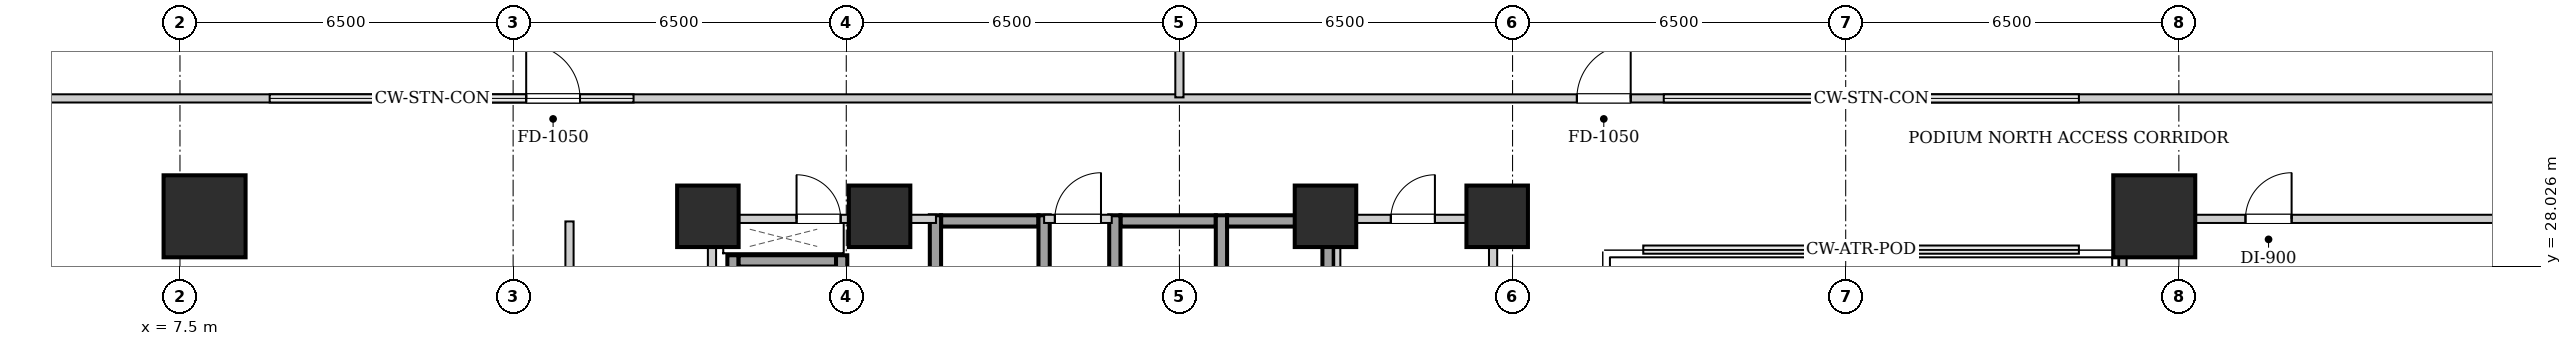
"""IFC4 building model, lengths in metres.
Left out: names, types, materials, properties, quantities, classifications, styles, units other than length and angle.
Written with IfcOpenShell. Run it as: python <this file> out.ifc"""

import sys

from ifc_helpers import new_model, si_unit, direction, frame, frame_2d, origin, origin_2d, place, context, subcontext, project, spatial, rectangle, extrude, element, fill, save


model = new_model("IFC4")
c1 = context("Model", 3, precision=1e-05, world=origin(), true_north=direction((0.0, 1.0)))
c2 = subcontext(c1, "Body", "Model", "MODEL_VIEW")
j1 = project(units=[si_unit("LENGTHUNIT", "METRE"), si_unit("PLANEANGLEUNIT", "RADIAN")], contexts=[c1])
p1 = place(None, origin())
s1 = spatial("IfcSite", under=j1, at=p1, CompositionType="ELEMENT")
p2 = place(p1, origin())
s2 = spatial("IfcBuilding", under=s1, at=p2, CompositionType="ELEMENT")
p3 = place(p2, frame((0.0, 0.0, 6.0)))
s3 = spatial("IfcBuildingStorey", under=s2, at=p3, CompositionType="ELEMENT", Elevation=6.0)
for number, where, z_axis, x_axis in (
    (1, (7.98, 29.0, 0.0), (0.0, 0.0, 1.0), (1.0, 0.0, 0.0)),
    (2, (46.02, 29.0, 0.0), (0.0, 0.0, 1.0), (1.0, 0.0, 0.0)),
):
    element("IfcColumn", number, at=place(p3, frame(where, z_axis=z_axis, x_axis=x_axis)), inside=s3, PredefinedType="COLUMN", context=c2, shape_type="SweptSolid", body=[
        extrude(rectangle(XDim=1.6, YDim=1.6, at=origin_2d()), origin(), (0.0, 0.0, 1.0), 5.2),
    ])
for number, where, z_axis, x_axis in (
    (3, (17.8, 29.0, 0.0), (0.0, 0.0, 1.0), (1.0, 0.0, 0.0)),
    (4, (21.15, 29.0, 0.0), (0.0, 0.0, 1.0), (1.0, 0.0, 0.0)),
    (5, (29.85, 29.0, 0.0), (0.0, 0.0, 1.0), (1.0, 0.0, 0.0)),
    (6, (33.2, 29.0, 0.0), (0.0, 0.0, 1.0), (1.0, 0.0, 0.0)),
):
    element("IfcColumn", number, at=place(p3, frame(where, z_axis=z_axis, x_axis=x_axis)), inside=s3, PredefinedType="COLUMN", context=c2, shape_type="SweptSolid", body=[
        extrude(rectangle(XDim=1.2, YDim=1.2, at=origin_2d()), origin(), (0.0, 0.0, 1.0), 5.2),
    ])
p4 = place(p3, frame((22.35, 28.91, 0.0), z_axis=(0.0, 0.0, 1.0), x_axis=(1.0, 0.0, 0.0)))
e7 = element("IfcWall", 7, at=p4, inside=s3, PredefinedType="SHEAR", context=c2, shape_type="SweptSolid", body=[
    extrude(rectangle(XDim=1.9, YDim=0.22, at=frame_2d((0.95, 0.0))), origin(), (0.0, 0.0, 1.0), 4.88),
])
for number, where, z_axis, x_axis in (
    (8, (22.24, 26.58, 0.0), (0.0, 0.0, 1.0), (0.0, 1.0, 0.0)),
    (9, (24.36, 26.58, 0.0), (0.0, 0.0, 1.0), (0.0, 1.0, 0.0)),
):
    element("IfcWall", number, at=place(p3, frame(where, z_axis=z_axis, x_axis=x_axis)), inside=s3, PredefinedType="SHEAR", context=c2, shape_type="SweptSolid", body=[
        extrude(rectangle(XDim=2.44, YDim=0.22, at=frame_2d((1.22, 0.0))), origin(), (0.0, 0.0, 1.0), 4.88),
    ])
p5 = place(p3, frame((25.85, 28.91, 0.0), z_axis=(0.0, 0.0, 1.0), x_axis=(1.0, 0.0, 0.0)))
e10 = element("IfcWall", 10, at=p5, inside=s3, PredefinedType="SHEAR", context=c2, shape_type="SweptSolid", body=[
    extrude(rectangle(XDim=1.86, YDim=0.22, at=frame_2d((0.93, 0.0))), origin(), (0.0, 0.0, 1.0), 4.88),
])
for number, where, z_axis, x_axis in (
    (11, (25.74, 26.58, 0.0), (0.0, 0.0, 1.0), (0.0, 1.0, 0.0)),
    (12, (27.82, 26.58, 0.0), (0.0, 0.0, 1.0), (0.0, 1.0, 0.0)),
):
    element("IfcWall", number, at=place(p3, frame(where, z_axis=z_axis, x_axis=x_axis)), inside=s3, PredefinedType="SHEAR", context=c2, shape_type="SweptSolid", body=[
        extrude(rectangle(XDim=2.44, YDim=0.22, at=frame_2d((1.22, 0.0))), origin(), (0.0, 0.0, 1.0), 4.88),
    ])
p6 = place(p3, frame((27.93, 28.91, 0.0), z_axis=(0.0, 0.0, 1.0), x_axis=(1.0, 0.0, 0.0)))
e13 = element("IfcWall", 13, at=p6, inside=s3, PredefinedType="SHEAR", context=c2, shape_type="SweptSolid", body=[
    extrude(rectangle(XDim=1.86, YDim=0.22, at=frame_2d((0.93, 0.0))), origin(), (0.0, 0.0, 1.0), 4.88),
])
p7 = place(p3, frame((29.9, 26.58, 0.0), z_axis=(0.0, 0.0, 1.0), x_axis=(0.0, 1.0, 0.0)))
e14 = element("IfcWall", 14, at=p7, inside=s3, PredefinedType="SHEAR", context=c2, shape_type="SweptSolid", body=[
    extrude(rectangle(XDim=2.44, YDim=0.22, at=frame_2d((1.22, 0.0))), origin(), (0.0, 0.0, 1.0), 4.88),
])
p8 = place(p3, frame((18.29, 24.1, 0.0), z_axis=(0.0, 0.0, 1.0), x_axis=(0.0, 1.0, 0.0)))
e15 = element("IfcWall", 15, at=p8, inside=s3, PredefinedType="SHEAR", context=c2, shape_type="SweptSolid", body=[
    extrude(rectangle(XDim=4.14, YDim=0.22, at=frame_2d((2.07, 0.0))), origin(), (0.0, 0.0, 1.0), 4.88),
])
p9 = place(p3, frame((18.4, 28.13, 0.0), z_axis=(0.0, 0.0, 1.0), x_axis=(1.0, 0.0, 0.0)))
e16 = element("IfcWall", 16, at=p9, inside=s3, PredefinedType="SHEAR", context=c2, shape_type="SweptSolid", body=[
    extrude(rectangle(XDim=1.9, YDim=0.22, at=frame_2d((0.95, 0.0))), origin(), (0.0, 0.0, 1.0), 4.88),
])
p10 = place(p3, frame((20.41, 26.06, 0.0), z_axis=(0.0, 0.0, 1.0), x_axis=(0.0, 1.0, 0.0)))
e17 = element("IfcWall", 17, at=p10, inside=s3, PredefinedType="SHEAR", context=c2, shape_type="SweptSolid", body=[
    extrude(rectangle(XDim=2.18, YDim=0.22, at=frame_2d((1.09, 0.0))), origin(), (0.0, 0.0, 1.0), 4.88),
])
for number, where, z_axis, x_axis in (
    (18, (17.88, 24.12, 0.0), (0.0, 0.0, 1.0), (0.0, 1.0, 0.0)),
    (19, (33.12, 24.12, 0.0), (0.0, 0.0, 1.0), (0.0, 1.0, 0.0)),
):
    element("IfcWall", number, at=place(p3, frame(where, z_axis=z_axis, x_axis=x_axis)), inside=s3, PredefinedType="PARTITIONING", context=c2, shape_type="SweptSolid", body=[
        extrude(rectangle(XDim=4.76, YDim=0.16, at=frame_2d((2.38, 0.0))), origin(), (0.0, 0.0, 1.0), 4.88),
    ])
p11 = place(p3, frame((24.36, 28.95, 0.0), z_axis=(0.0, 0.0, 1.0), x_axis=(1.0, 0.0, 0.0)))
e20 = element("IfcWall", 20, at=p11, inside=s3, PredefinedType="PARTITIONING", context=c2, shape_type="SweptSolid", body=[
    extrude(rectangle(XDim=1.32, YDim=0.16, at=frame_2d((0.66, 0.0))), origin(), (0.0, 0.0, 1.0), 4.88),
])
p12 = place(p11, frame((0.21, 0.0, 0.0)))
e21 = element("IfcOpeningElement", 21, at=p12, cuts=e20, PredefinedType="OPENING", context=c2, shape_type="SweptSolid", body=[
    extrude(rectangle(XDim=0.9, YDim=2.05, at=frame_2d((0.45, 1.025))), frame((0.0, 0.09, 0.0), z_axis=(0.0, -1.0, 0.0), x_axis=(1.0, 0.0, 0.0)), (0.0, 0.0, 1.0), 0.18),
])
p13 = place(p3, frame((17.96, 28.95, 0.0), z_axis=(0.0, 0.0, 1.0), x_axis=(1.0, 0.0, 0.0)))
e22 = element("IfcWall", 22, at=p13, inside=s3, PredefinedType="PARTITIONING", context=c2, shape_type="SweptSolid", body=[
    extrude(rectangle(XDim=4.29, YDim=0.16, at=frame_2d((2.145, 0.0))), origin(), (0.0, 0.0, 1.0), 4.88),
])
p14 = place(p13, frame((1.57, 0.0, 0.0)))
e23 = element("IfcOpeningElement", 23, at=p14, cuts=e22, PredefinedType="OPENING", context=c2, shape_type="SweptSolid", body=[
    extrude(rectangle(XDim=0.86, YDim=2.05, at=frame_2d((0.43, 1.025))), frame((0.0, 0.09, 0.0), z_axis=(0.0, -1.0, 0.0), x_axis=(1.0, 0.0, 0.0)), (0.0, 0.0, 1.0), 0.18),
])
p15 = place(p3, frame((30.08, 26.18, 0.0), z_axis=(0.0, 0.0, 1.0), x_axis=(0.0, 1.0, 0.0)))
e24 = element("IfcWall", 24, at=p15, inside=s3, PredefinedType="PARTITIONING", context=c2, shape_type="SweptSolid", body=[
    extrude(rectangle(XDim=2.68, YDim=0.12, at=frame_2d((1.34, 0.0))), origin(), (0.0, 0.0, 1.0), 4.88),
])
p16 = place(p3, frame((30.08, 28.95, 0.0), z_axis=(0.0, 0.0, 1.0), x_axis=(1.0, 0.0, 0.0)))
e25 = element("IfcWall", 25, at=p16, inside=s3, PredefinedType="PARTITIONING", context=c2, shape_type="SweptSolid", body=[
    extrude(rectangle(XDim=2.96, YDim=0.16, at=frame_2d((1.48, 0.0))), origin(), (0.0, 0.0, 1.0), 4.88),
])
p17 = place(p16, frame((1.045, 0.0, 0.0)))
e26 = element("IfcOpeningElement", 26, at=p17, cuts=e25, PredefinedType="OPENING", context=c2, shape_type="SweptSolid", body=[
    extrude(rectangle(XDim=0.86, YDim=2.05, at=frame_2d((0.43, 1.025))), frame((0.0, 0.09, 0.0), z_axis=(0.0, -1.0, 0.0), x_axis=(1.0, 0.0, 0.0)), (0.0, 0.0, 1.0), 0.18),
])
p18 = place(p3, frame((0.28, 31.3, 0.0), z_axis=(0.0, 0.0, 1.0), x_axis=(1.0, 0.0, 0.0)))
e27 = element("IfcWall", 27, at=p18, inside=s3, PredefinedType="PARTITIONING", context=c2, shape_type="SweptSolid", body=[
    extrude(rectangle(XDim=53.44, YDim=0.16, at=frame_2d((26.72, 0.0))), origin(), (0.0, 0.0, 1.0), 4.88),
])
p19 = place(p18, frame((13.975, 0.0, 0.0)))
e28 = element("IfcOpeningElement", 28, at=p19, cuts=e27, PredefinedType="OPENING", context=c2, shape_type="SweptSolid", body=[
    extrude(rectangle(XDim=1.05, YDim=2.05, at=frame_2d((0.525, 1.025))), frame((0.0, 0.09, 0.0), z_axis=(0.0, -1.0, 0.0), x_axis=(1.0, 0.0, 0.0)), (0.0, 0.0, 1.0), 0.18),
])
p20 = place(p18, frame((34.475, 0.0, 0.0)))
e29 = element("IfcOpeningElement", 29, at=p20, cuts=e27, PredefinedType="OPENING", context=c2, shape_type="SweptSolid", body=[
    extrude(rectangle(XDim=1.05, YDim=2.05, at=frame_2d((0.525, 1.025))), frame((0.0, 0.09, 0.0), z_axis=(0.0, -1.0, 0.0), x_axis=(1.0, 0.0, 0.0)), (0.0, 0.0, 1.0), 0.18),
])
p21 = place(p3, frame((15.1, 15.1, 0.0), z_axis=(0.0, 0.0, 1.0), x_axis=(0.0, 1.0, 0.0)))
e30 = element("IfcWall", 30, at=p21, inside=s3, PredefinedType="PARTITIONING", context=c2, shape_type="SweptSolid", body=[
    extrude(rectangle(XDim=13.8, YDim=0.16, at=frame_2d((6.9, 0.0))), origin(), (0.0, 0.0, 1.0), 4.88),
])
p22 = place(p21, frame((6.475, 0.0, 0.0)))
e31 = element("IfcOpeningElement", 31, at=p22, cuts=e30, PredefinedType="OPENING", context=c2, shape_type="SweptSolid", body=[
    extrude(rectangle(XDim=1.05, YDim=2.05, at=frame_2d((0.525, 1.025))), frame((0.0, 0.09, 0.0), z_axis=(0.0, -1.0, 0.0), x_axis=(1.0, 0.0, 0.0)), (0.0, 0.0, 1.0), 0.18),
])
p23 = place(p3, frame((45.4, 28.95, 0.0), z_axis=(0.0, 0.0, 1.0), x_axis=(1.0, 0.0, 0.0)))
e32 = element("IfcWall", 32, at=p23, inside=s3, PredefinedType="PARTITIONING", context=c2, shape_type="SweptSolid", body=[
    extrude(rectangle(XDim=8.32, YDim=0.16, at=frame_2d((4.16, 0.0))), origin(), (0.0, 0.0, 1.0), 3.765),
])
p24 = place(p23, frame((2.4, 0.0, 0.0)))
e33 = element("IfcOpeningElement", 33, at=p24, cuts=e32, PredefinedType="OPENING", context=c2, shape_type="SweptSolid", body=[
    extrude(rectangle(XDim=0.9, YDim=2.05, at=frame_2d((0.45, 1.025))), frame((0.0, 0.09, 0.0), z_axis=(0.0, -1.0, 0.0), x_axis=(1.0, 0.0, 0.0)), (0.0, 0.0, 1.0), 0.18),
])
p25 = place(p3, frame((45.4, 15.1, 0.0), z_axis=(0.0, 0.0, 1.0), x_axis=(0.0, 1.0, 0.0)))
e34 = element("IfcWall", 34, at=p25, inside=s3, PredefinedType="PARTITIONING", context=c2, shape_type="SweptSolid", body=[
    extrude(rectangle(XDim=13.78, YDim=0.16, at=frame_2d((6.89, 0.0))), origin(), (0.0, 0.0, 1.0), 4.88),
])
p26 = place(p3, frame((27.0, 31.32, 0.0), z_axis=(0.0, 0.0, 1.0), x_axis=(0.0, 1.0, 0.0)))
e35 = element("IfcWall", 35, at=p26, inside=s3, PredefinedType="PARTITIONING", context=c2, shape_type="SweptSolid", body=[
    extrude(rectangle(XDim=16.0, YDim=0.16, at=frame_2d((8.0, 0.0))), origin(), (0.0, 0.0, 1.0), 4.88),
])
p27 = place(p12, origin())
e36 = element("IfcDoor", 36, at=p27, inside=s3, OperationType="SINGLE_SWING_RIGHT", PredefinedType="DOOR", context=c2, shape_type="SweptSolid", body=[
    extrude(rectangle(XDim=0.9, YDim=2.05, at=frame_2d((0.45, 1.025))), frame((0.0, 0.025, 0.0), z_axis=(0.0, -1.0, 0.0), x_axis=(1.0, 0.0, 0.0)), (0.0, 0.0, 1.0), 0.05),
])
fill(e21, e36)
p28 = place(p14, origin())
e37 = element("IfcDoor", 37, at=p28, inside=s3, OperationType="SINGLE_SWING_LEFT", PredefinedType="DOOR", context=c2, shape_type="SweptSolid", body=[
    extrude(rectangle(XDim=0.86, YDim=2.05, at=frame_2d((0.43, 1.025))), frame((0.0, 0.025, 0.0), z_axis=(0.0, -1.0, 0.0), x_axis=(1.0, 0.0, 0.0)), (0.0, 0.0, 1.0), 0.05),
])
fill(e23, e37)
p29 = place(p17, origin())
e38 = element("IfcDoor", 38, at=p29, inside=s3, OperationType="SINGLE_SWING_RIGHT", PredefinedType="DOOR", context=c2, shape_type="SweptSolid", body=[
    extrude(rectangle(XDim=0.86, YDim=2.05, at=frame_2d((0.43, 1.025))), frame((0.0, 0.025, 0.0), z_axis=(0.0, -1.0, 0.0), x_axis=(1.0, 0.0, 0.0)), (0.0, 0.0, 1.0), 0.05),
])
fill(e26, e38)
p30 = place(p19, origin())
e39 = element("IfcDoor", 39, at=p30, inside=s3, OperationType="SINGLE_SWING_LEFT", PredefinedType="DOOR", context=c2, shape_type="SweptSolid", body=[
    extrude(rectangle(XDim=1.05, YDim=2.05, at=frame_2d((0.525, 1.025))), frame((0.0, 0.025, 0.0), z_axis=(0.0, -1.0, 0.0), x_axis=(1.0, 0.0, 0.0)), (0.0, 0.0, 1.0), 0.05),
])
fill(e28, e39)
p31 = place(p20, origin())
e40 = element("IfcDoor", 40, at=p31, inside=s3, OperationType="SINGLE_SWING_RIGHT", PredefinedType="DOOR", context=c2, shape_type="SweptSolid", body=[
    extrude(rectangle(XDim=1.05, YDim=2.05, at=frame_2d((0.525, 1.025))), frame((0.0, 0.025, 0.0), z_axis=(0.0, -1.0, 0.0), x_axis=(1.0, 0.0, 0.0)), (0.0, 0.0, 1.0), 0.05),
])
fill(e29, e40)
p32 = place(p24, origin())
e41 = element("IfcDoor", 41, at=p32, inside=s3, OperationType="SINGLE_SWING_RIGHT", PredefinedType="DOOR", context=c2, shape_type="SweptSolid", body=[
    extrude(rectangle(XDim=0.9, YDim=2.05, at=frame_2d((0.45, 1.025))), frame((0.0, 0.025, 0.0), z_axis=(0.0, -1.0, 0.0), x_axis=(1.0, 0.0, 0.0)), (0.0, 0.0, 1.0), 0.05),
])
fill(e33, e41)
save(model, sys.argv[1])
